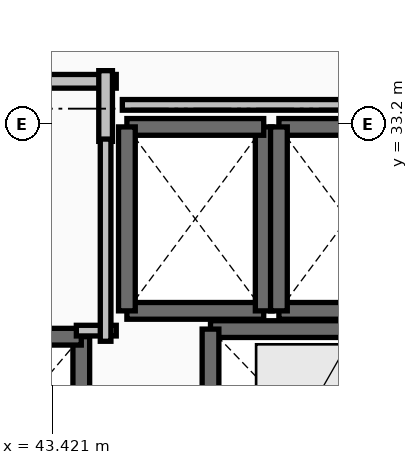
"""IFC4 building model, lengths in metres.
Left out: names, types, materials, properties, quantities, classifications, styles, units other than length and angle.
Written with IfcOpenShell. Run it as: python <this file> out.ifc"""

import sys

from ifc_helpers import new_model, si_unit, direction, frame, frame_2d, origin, place, context, subcontext, project, spatial, rectangle, extrude, element, save


model = new_model("IFC4")
c1 = context("Model", 3, precision=1e-05, world=origin(), true_north=direction((0.0, 1.0)))
c2 = subcontext(c1, "Body", "Model", "MODEL_VIEW")
j1 = project(units=[si_unit("LENGTHUNIT", "METRE"), si_unit("PLANEANGLEUNIT", "RADIAN")], contexts=[c1])
p1 = place(None, origin())
s1 = spatial("IfcSite", under=j1, at=p1, CompositionType="ELEMENT")
p2 = place(p1, origin())
s2 = spatial("IfcBuilding", under=s1, at=p2, CompositionType="ELEMENT")
p3 = place(p2, frame((0.0, 0.0, 221.4)))
s3 = spatial("IfcBuildingStorey", under=s2, at=p3, CompositionType="ELEMENT", Elevation=221.4)
p4 = place(p3, frame((43.8, 27.8, 0.0), z_axis=(0.0, 0.0, 1.0), x_axis=(0.0, 1.0, 0.0)))
e1 = element("IfcWall", 1, at=p4, inside=s3, PredefinedType="SOLIDWALL", context=c2, shape_type="SweptSolid", body=[
    extrude(rectangle(XDim=2.6, YDim=0.22, at=frame_2d((1.3, 0.0))), origin(), (0.0, 0.0, 1.0), 3.2),
])
p5 = place(p3, frame((43.8, 30.4, 0.0), z_axis=(0.0, 0.0, 1.0), x_axis=(-1.0, 0.0, 0.0)))
e2 = element("IfcWall", 2, at=p5, inside=s3, PredefinedType="SOLIDWALL", context=c2, shape_type="SweptSolid", body=[
    extrude(rectangle(XDim=2.2, YDim=0.22, at=frame_2d((1.1, 0.0))), origin(), (0.0, 0.0, 1.0), 3.2),
])
p6 = place(p3, frame((44.4, 30.74, 0.0), z_axis=(0.0, 0.0, 1.0), x_axis=(1.0, 0.0, 0.0)))
e3 = element("IfcWall", 3, at=p6, inside=s3, PredefinedType="SOLIDWALL", context=c2, shape_type="SweptSolid", body=[
    extrude(rectangle(XDim=1.8, YDim=0.22, at=frame_2d((0.9, 0.0))), origin(), (0.0, 0.0, 1.0), 3.2),
])
p7 = place(p3, frame((46.2, 30.74, 0.0), z_axis=(0.0, 0.0, 1.0), x_axis=(0.0, 1.0, 0.0)))
e4 = element("IfcWall", 4, at=p7, inside=s3, PredefinedType="SOLIDWALL", context=c2, shape_type="SweptSolid", body=[
    extrude(rectangle(XDim=2.42, YDim=0.22, at=frame_2d((1.21, 0.0))), origin(), (0.0, 0.0, 1.0), 3.2),
])
p8 = place(p3, frame((46.2, 33.16, 0.0), z_axis=(0.0, 0.0, 1.0), x_axis=(-1.0, 0.0, 0.0)))
e5 = element("IfcWall", 5, at=p8, inside=s3, PredefinedType="SOLIDWALL", context=c2, shape_type="SweptSolid", body=[
    extrude(rectangle(XDim=1.8, YDim=0.22, at=frame_2d((0.9, 0.0))), origin(), (0.0, 0.0, 1.0), 3.2),
])
p9 = place(p3, frame((44.4, 33.16, 0.0), z_axis=(0.0, 0.0, 1.0), x_axis=(0.0, -1.0, 0.0)))
e6 = element("IfcWall", 6, at=p9, inside=s3, PredefinedType="SOLIDWALL", context=c2, shape_type="SweptSolid", body=[
    extrude(rectangle(XDim=2.42, YDim=0.22, at=frame_2d((1.21, 0.0))), origin(), (0.0, 0.0, 1.0), 3.2),
])
for number, where, z_axis, x_axis in (
    (7, (46.4, 30.74, 0.0), (0.0, 0.0, 1.0), (1.0, 0.0, 0.0)),
    (8, (48.2, 33.16, 0.0), (0.0, 0.0, 1.0), (-1.0, 0.0, 0.0)),
):
    element("IfcWall", number, at=place(p3, frame(where, z_axis=z_axis, x_axis=x_axis)), inside=s3, PredefinedType="SOLIDWALL", context=c2, shape_type="SweptSolid", body=[
        extrude(rectangle(XDim=1.8, YDim=0.22, at=frame_2d((0.9, 0.0))), origin(), (0.0, 0.0, 1.0), 3.2),
    ])
p10 = place(p3, frame((46.4, 33.16, 0.0), z_axis=(0.0, 0.0, 1.0), x_axis=(0.0, -1.0, 0.0)))
e9 = element("IfcWall", 9, at=p10, inside=s3, PredefinedType="SOLIDWALL", context=c2, shape_type="SweptSolid", body=[
    extrude(rectangle(XDim=2.42, YDim=0.22, at=frame_2d((1.21, 0.0))), origin(), (0.0, 0.0, 1.0), 3.2),
])
p11 = place(p3, frame((47.9, 30.5, 0.0), z_axis=(0.0, 0.0, 1.0), x_axis=(-1.0, 0.0, 0.0)))
e10 = element("IfcWall", 10, at=p11, inside=s3, PredefinedType="SHEAR", context=c2, shape_type="SweptSolid", body=[
    extrude(rectangle(XDim=2.4, YDim=0.22, at=frame_2d((1.2, 0.0))), origin(), (0.0, 0.0, 1.0), 3.2),
])
p12 = place(p3, frame((45.5, 30.5, 0.0), z_axis=(0.0, 0.0, 1.0), x_axis=(0.0, -1.0, 0.0)))
e11 = element("IfcWall", 11, at=p12, inside=s3, PredefinedType="SHEAR", context=c2, shape_type="SweptSolid", body=[
    extrude(rectangle(XDim=2.5, YDim=0.22, at=frame_2d((1.25, 0.0))), origin(), (0.0, 0.0, 1.0), 3.2),
])
p13 = place(p3, frame((44.26, 33.76, 0.0), z_axis=(0.0, 0.0, 1.0), x_axis=(-1.0, 0.0, 0.0)))
e12 = element("IfcWall", 12, at=p13, inside=s3, PredefinedType="PARTITIONING", context=c2, shape_type="SweptSolid", body=[
    extrude(rectangle(XDim=4.61, YDim=0.18, at=frame_2d((2.305, 0.0))), origin(), (0.0, 0.0, 1.0), 3.2),
])
p14 = place(p13, frame((1.88, 0.0, 0.0)))
e13 = element("IfcOpeningElement", 13, at=p14, cuts=e12, PredefinedType="OPENING", context=c2, shape_type="SweptSolid", body=[
    extrude(rectangle(XDim=0.85, YDim=2.1, at=frame_2d((0.425, 1.05))), frame((0.0, 0.105, 0.0), z_axis=(0.0, -1.0, 0.0), x_axis=(1.0, 0.0, 0.0)), (0.0, 0.0, 1.0), 0.21),
])
p15 = place(p3, frame((44.12, 32.97, 0.0), z_axis=(0.0, 0.0, 1.0), x_axis=(0.0, 1.0, 0.0)))
e14 = element("IfcWall", 14, at=p15, inside=s3, PredefinedType="PARTITIONING", context=c2, shape_type="SweptSolid", body=[
    extrude(rectangle(XDim=0.93, YDim=0.18, at=frame_2d((0.465, 0.0))), origin(), (0.0, 0.0, 1.0), 3.2),
])
p16 = place(p3, frame((43.735, 30.48, 0.0), z_axis=(0.0, 0.0, 1.0), x_axis=(1.0, 0.0, 0.0)))
e15 = element("IfcWall", 15, at=p16, inside=s3, PredefinedType="PARTITIONING", context=c2, shape_type="SweptSolid", body=[
    extrude(rectangle(XDim=0.525, YDim=0.14, at=frame_2d((0.262, 0.0))), origin(), (0.0, 0.0, 1.0), 3.2),
])
p17 = place(p3, frame((44.12, 30.34, 0.0), z_axis=(0.0, 0.0, 1.0), x_axis=(0.0, 1.0, 0.0)))
e16 = element("IfcWall", 16, at=p17, inside=s3, PredefinedType="PARTITIONING", context=c2, shape_type="SweptSolid", body=[
    extrude(rectangle(XDim=2.66, YDim=0.14, at=frame_2d((1.33, 0.0))), origin(), (0.0, 0.0, 1.0), 3.2),
])
p18 = place(p3, frame((48.55, 33.45, 0.0), z_axis=(0.0, 0.0, 1.0), x_axis=(-1.0, 0.0, 0.0)))
e17 = element("IfcWall", 17, at=p18, inside=s3, PredefinedType="PARTITIONING", context=c2, shape_type="SweptSolid", body=[
    extrude(rectangle(XDim=4.21, YDim=0.14, at=frame_2d((2.105, 0.0))), origin(), (0.0, 0.0, 1.0), 2.392),
])
save(model, sys.argv[1])
